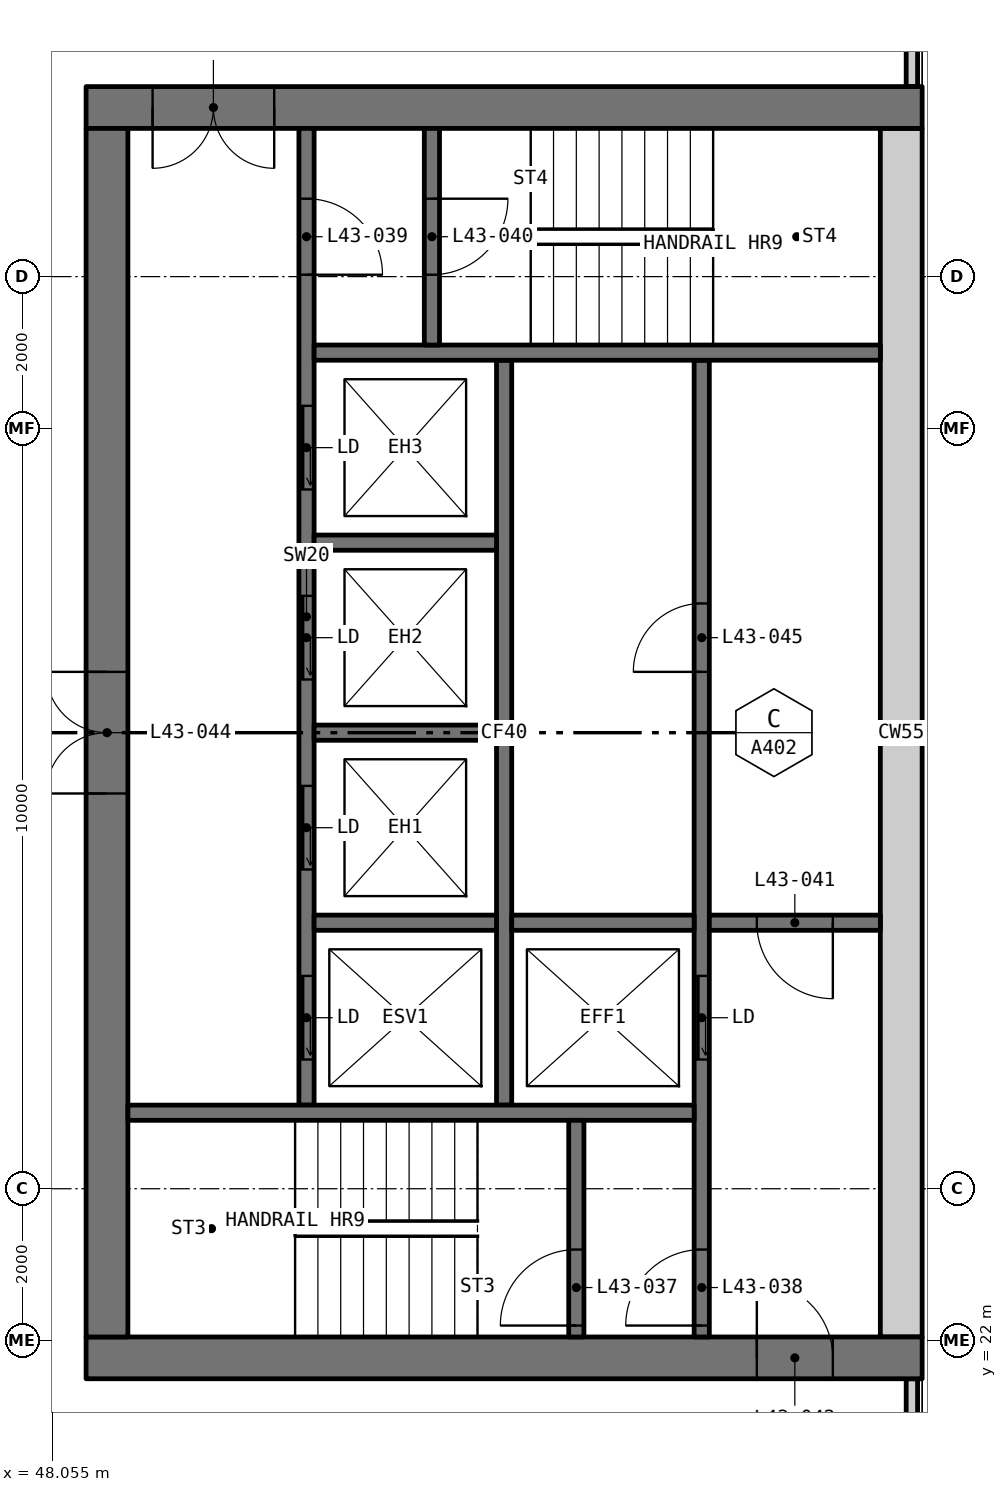
"""IFC4 building model, lengths in metres.
Left out: names, types, materials, properties, quantities, classifications, styles, units other than length and angle.
Written with IfcOpenShell. Run it as: python <this file> out.ifc"""

import sys

from ifc_helpers import new_model, si_unit, direction, frame, frame_2d, origin, place, context, subcontext, project, spatial, rectangle, extrude, element, fill, save


model = new_model("IFC4")
c1 = context("Model", 3, precision=1e-05, world=origin(), true_north=direction((0.0, 1.0)))
c2 = subcontext(c1, "Body", "Model", "MODEL_VIEW")
j1 = project(units=[si_unit("LENGTHUNIT", "METRE"), si_unit("PLANEANGLEUNIT", "RADIAN")], contexts=[c1])
p1 = place(None, origin())
s1 = spatial("IfcSite", under=j1, at=p1, CompositionType="ELEMENT")
p2 = place(p1, origin())
s2 = spatial("IfcBuilding", under=s1, at=p2, CompositionType="ELEMENT")
p3 = place(p2, frame((0.0, 0.0, 165.15)))
s3 = spatial("IfcBuildingStorey", under=s2, at=p3, CompositionType="ELEMENT", Elevation=165.15)
for number, where, z_axis, x_axis in (
    (1, (59.365, 18.71, 0.0), (0.0, 0.0, 1.0), (0.0, 1.0, 0.0)),
    (2, (59.365, 38.5, 0.0), (0.0, 0.0, 1.0), (0.0, 1.0, 0.0)),
):
    element("IfcWall", number, at=place(p3, frame(where, z_axis=z_axis, x_axis=x_axis)), inside=s3, PredefinedType="ELEMENTEDWALL", context=c2, shape_type="SweptSolid", body=[
        extrude(rectangle(XDim=2.79, YDim=0.15, at=frame_2d((1.395, 0.0))), origin(), (0.0, 0.0, 1.0), 3.05),
    ])
p4 = place(p3, frame((59.5, 21.775, 0.0), z_axis=(0.0, 0.0, 1.0), x_axis=(-1.0, 0.0, 0.0)))
e3 = element("IfcWall", 3, at=p4, inside=s3, PredefinedType="SHEAR", context=c2, shape_type="SweptSolid", body=[
    extrude(rectangle(XDim=11.0, YDim=0.55, at=frame_2d((5.5, 0.0))), origin(), (0.0, 0.0, 1.0), 3.05),
])
p5 = place(p4, frame((1.175, 0.0, 0.0)))
e4 = element("IfcOpeningElement", 4, at=p5, cuts=e3, PredefinedType="OPENING", context=c2, shape_type="SweptSolid", body=[
    extrude(rectangle(XDim=1.0, YDim=2.1, at=frame_2d((0.5, 1.05))), frame((0.0, 0.285, 0.0), z_axis=(0.0, -1.0, 0.0), x_axis=(1.0, 0.0, 0.0)), (0.0, 0.0, 1.0), 0.57),
])
p6 = place(p3, frame((59.5, 38.225, 0.0), z_axis=(0.0, 0.0, 1.0), x_axis=(-1.0, 0.0, 0.0)))
e5 = element("IfcWall", 5, at=p6, inside=s3, PredefinedType="SHEAR", context=c2, shape_type="SweptSolid", body=[
    extrude(rectangle(XDim=11.0, YDim=0.55, at=frame_2d((5.5, 0.0))), origin(), (0.0, 0.0, 1.0), 3.05),
])
p7 = place(p6, frame((8.525, 0.0, 0.0)))
e6 = element("IfcOpeningElement", 6, at=p7, cuts=e5, PredefinedType="OPENING", context=c2, shape_type="SweptSolid", body=[
    extrude(rectangle(XDim=1.6, YDim=2.1, at=frame_2d((0.8, 1.05))), frame((0.0, 0.285, 0.0), z_axis=(0.0, -1.0, 0.0), x_axis=(1.0, 0.0, 0.0)), (0.0, 0.0, 1.0), 0.57),
])
p8 = place(p3, frame((59.225, 22.05, 0.0), z_axis=(0.0, 0.0, 1.0), x_axis=(0.0, 1.0, 0.0)))
e7 = element("IfcWall", 7, at=p8, inside=s3, PredefinedType="SHEAR", context=c2, shape_type="SweptSolid", body=[
    extrude(rectangle(XDim=15.9, YDim=0.55, at=frame_2d((7.95, 0.0))), origin(), (0.0, 0.0, 1.0), 3.05),
])
p9 = place(p3, frame((48.775, 22.05, 0.0), z_axis=(0.0, 0.0, 1.0), x_axis=(0.0, 1.0, 0.0)))
e8 = element("IfcWall", 8, at=p9, inside=s3, PredefinedType="SHEAR", context=c2, shape_type="SweptSolid", body=[
    extrude(rectangle(XDim=15.9, YDim=0.55, at=frame_2d((7.95, 0.0))), origin(), (0.0, 0.0, 1.0), 3.05),
])
p10 = place(p9, frame((7.15, 0.0, 0.0)))
e9 = element("IfcOpeningElement", 9, at=p10, cuts=e8, PredefinedType="OPENING", context=c2, shape_type="SweptSolid", body=[
    extrude(rectangle(XDim=1.6, YDim=2.1, at=frame_2d((0.8, 1.05))), frame((0.0, 0.285, 0.0), z_axis=(0.0, -1.0, 0.0), x_axis=(1.0, 0.0, 0.0)), (0.0, 0.0, 1.0), 0.57),
])
p11 = place(p3, frame((56.6, 22.05, 0.0), z_axis=(0.0, 0.0, 1.0), x_axis=(0.0, 1.0, 0.0)))
e10 = element("IfcWall", 10, at=p11, inside=s3, PredefinedType="SOLIDWALL", context=c2, shape_type="SweptSolid", body=[
    extrude(rectangle(XDim=12.85, YDim=0.2, at=frame_2d((6.425, 0.0))), origin(), (0.0, 0.0, 1.0), 3.05),
])
p12 = place(p11, frame((3.65, 0.0, 0.0)))
e11 = element("IfcOpeningElement", 11, at=p12, cuts=e10, PredefinedType="OPENING", context=c2, shape_type="SweptSolid", body=[
    extrude(rectangle(XDim=1.1, YDim=2.1, at=frame_2d((0.55, 1.05))), frame((0.0, 0.11, 0.0), z_axis=(0.0, -1.0, 0.0), x_axis=(1.0, 0.0, 0.0)), (0.0, 0.0, 1.0), 0.22),
])
p13 = place(p11, frame((0.15, 0.0, 0.0)))
e12 = element("IfcOpeningElement", 12, at=p13, cuts=e10, PredefinedType="OPENING", context=c2, shape_type="SweptSolid", body=[
    extrude(rectangle(XDim=1.0, YDim=2.1, at=frame_2d((0.5, 1.05))), frame((0.0, 0.11, 0.0), z_axis=(0.0, -1.0, 0.0), x_axis=(1.0, 0.0, 0.0)), (0.0, 0.0, 1.0), 0.22),
])
p14 = place(p11, frame((8.75, 0.0, 0.0)))
e13 = element("IfcOpeningElement", 13, at=p14, cuts=e10, PredefinedType="OPENING", context=c2, shape_type="SweptSolid", body=[
    extrude(rectangle(XDim=0.9, YDim=2.1, at=frame_2d((0.45, 1.05))), frame((0.0, 0.11, 0.0), z_axis=(0.0, -1.0, 0.0), x_axis=(1.0, 0.0, 0.0)), (0.0, 0.0, 1.0), 0.22),
])
p15 = place(p3, frame((51.4, 25.1, 0.0), z_axis=(0.0, 0.0, 1.0), x_axis=(0.0, 1.0, 0.0)))
e14 = element("IfcWall", 14, at=p15, inside=s3, PredefinedType="SOLIDWALL", context=c2, shape_type="SweptSolid", body=[
    extrude(rectangle(XDim=12.85, YDim=0.2, at=frame_2d((6.425, 0.0))), origin(), (0.0, 0.0, 1.0), 3.05),
])
p16 = place(p15, frame((0.6, 0.0, 0.0)))
e15 = element("IfcOpeningElement", 15, at=p16, cuts=e14, PredefinedType="OPENING", context=c2, shape_type="SweptSolid", body=[
    extrude(rectangle(XDim=1.1, YDim=2.1, at=frame_2d((0.55, 1.05))), frame((0.0, 0.11, 0.0), z_axis=(0.0, -1.0, 0.0), x_axis=(1.0, 0.0, 0.0)), (0.0, 0.0, 1.0), 0.22),
])
p17 = place(p15, frame((3.1, 0.0, 0.0)))
e16 = element("IfcOpeningElement", 16, at=p17, cuts=e14, PredefinedType="OPENING", context=c2, shape_type="SweptSolid", body=[
    extrude(rectangle(XDim=1.1, YDim=2.1, at=frame_2d((0.55, 1.05))), frame((0.0, 0.11, 0.0), z_axis=(0.0, -1.0, 0.0), x_axis=(1.0, 0.0, 0.0)), (0.0, 0.0, 1.0), 0.22),
])
p18 = place(p15, frame((5.6, 0.0, 0.0)))
e17 = element("IfcOpeningElement", 17, at=p18, cuts=e14, PredefinedType="OPENING", context=c2, shape_type="SweptSolid", body=[
    extrude(rectangle(XDim=1.1, YDim=2.1, at=frame_2d((0.55, 1.05))), frame((0.0, 0.11, 0.0), z_axis=(0.0, -1.0, 0.0), x_axis=(1.0, 0.0, 0.0)), (0.0, 0.0, 1.0), 0.22),
])
p19 = place(p15, frame((8.1, 0.0, 0.0)))
e18 = element("IfcOpeningElement", 18, at=p19, cuts=e14, PredefinedType="OPENING", context=c2, shape_type="SweptSolid", body=[
    extrude(rectangle(XDim=1.1, YDim=2.1, at=frame_2d((0.55, 1.05))), frame((0.0, 0.11, 0.0), z_axis=(0.0, -1.0, 0.0), x_axis=(1.0, 0.0, 0.0)), (0.0, 0.0, 1.0), 0.22),
])
p20 = place(p15, frame((10.925, 0.0, 0.0)))
e19 = element("IfcOpeningElement", 19, at=p20, cuts=e14, PredefinedType="OPENING", context=c2, shape_type="SweptSolid", body=[
    extrude(rectangle(XDim=1.0, YDim=2.1, at=frame_2d((0.5, 1.05))), frame((0.0, 0.11, 0.0), z_axis=(0.0, -1.0, 0.0), x_axis=(1.0, 0.0, 0.0)), (0.0, 0.0, 1.0), 0.22),
])
p21 = place(p3, frame((54.0, 25.1, 0.0), z_axis=(0.0, 0.0, 1.0), x_axis=(0.0, 1.0, 0.0)))
e20 = element("IfcWall", 20, at=p21, inside=s3, PredefinedType="SOLIDWALL", context=c2, shape_type="SweptSolid", body=[
    extrude(rectangle(XDim=9.8, YDim=0.2, at=frame_2d((4.9, 0.0))), origin(), (0.0, 0.0, 1.0), 3.05),
])
for number, where, z_axis, x_axis in (
    (21, (56.5, 25.0, 0.0), (0.0, 0.0, 1.0), (-1.0, 0.0, 0.0)),
    (22, (58.95, 35.0, 0.0), (0.0, 0.0, 1.0), (-1.0, 0.0, 0.0)),
):
    element("IfcWall", number, at=place(p3, frame(where, z_axis=z_axis, x_axis=x_axis)), inside=s3, PredefinedType="SOLIDWALL", context=c2, shape_type="SweptSolid", body=[
        extrude(rectangle(XDim=7.45, YDim=0.2, at=frame_2d((3.725, 0.0))), origin(), (0.0, 0.0, 1.0), 3.05),
    ])
p22 = place(p3, frame((58.95, 27.5, 0.0), z_axis=(0.0, 0.0, 1.0), x_axis=(-1.0, 0.0, 0.0)))
e23 = element("IfcWall", 23, at=p22, inside=s3, PredefinedType="SOLIDWALL", context=c2, shape_type="SweptSolid", body=[
    extrude(rectangle(XDim=2.25, YDim=0.2, at=frame_2d((1.125, 0.0))), origin(), (0.0, 0.0, 1.0), 3.05),
])
p23 = place(p22, frame((0.625, 0.0, 0.0)))
e24 = element("IfcOpeningElement", 24, at=p23, cuts=e23, PredefinedType="OPENING", context=c2, shape_type="SweptSolid", body=[
    extrude(rectangle(XDim=1.0, YDim=2.1, at=frame_2d((0.5, 1.05))), frame((0.0, 0.11, 0.0), z_axis=(0.0, -1.0, 0.0), x_axis=(1.0, 0.0, 0.0)), (0.0, 0.0, 1.0), 0.22),
])
p24 = place(p3, frame((54.95, 22.05, 0.0), z_axis=(0.0, 0.0, 1.0), x_axis=(0.0, 1.0, 0.0)))
e25 = element("IfcWall", 25, at=p24, inside=s3, PredefinedType="SOLIDWALL", context=c2, shape_type="SweptSolid", body=[
    extrude(rectangle(XDim=2.85, YDim=0.2, at=frame_2d((1.425, 0.0))), origin(), (0.0, 0.0, 1.0), 3.05),
])
p25 = place(p24, frame((0.15, 0.0, 0.0)))
e26 = element("IfcOpeningElement", 26, at=p25, cuts=e25, PredefinedType="OPENING", context=c2, shape_type="SweptSolid", body=[
    extrude(rectangle(XDim=1.0, YDim=2.1, at=frame_2d((0.5, 1.05))), frame((0.0, 0.11, 0.0), z_axis=(0.0, -1.0, 0.0), x_axis=(1.0, 0.0, 0.0)), (0.0, 0.0, 1.0), 0.22),
])
p26 = place(p3, frame((53.05, 35.1, 0.0), z_axis=(0.0, 0.0, 1.0), x_axis=(0.0, 1.0, 0.0)))
e27 = element("IfcWall", 27, at=p26, inside=s3, PredefinedType="SOLIDWALL", context=c2, shape_type="SweptSolid", body=[
    extrude(rectangle(XDim=2.85, YDim=0.2, at=frame_2d((1.425, 0.0))), origin(), (0.0, 0.0, 1.0), 3.05),
])
p27 = place(p26, frame((0.925, 0.0, 0.0)))
e28 = element("IfcOpeningElement", 28, at=p27, cuts=e27, PredefinedType="OPENING", context=c2, shape_type="SweptSolid", body=[
    extrude(rectangle(XDim=1.0, YDim=2.1, at=frame_2d((0.5, 1.05))), frame((0.0, 0.11, 0.0), z_axis=(0.0, -1.0, 0.0), x_axis=(1.0, 0.0, 0.0)), (0.0, 0.0, 1.0), 0.22),
])
for number, where, z_axis, x_axis in (
    (29, (56.5, 27.5, 0.0), (0.0, 0.0, 1.0), (-1.0, 0.0, 0.0)),
    (30, (53.9, 27.5, 0.0), (0.0, 0.0, 1.0), (-1.0, 0.0, 0.0)),
    (31, (53.9, 30.0, 0.0), (0.0, 0.0, 1.0), (-1.0, 0.0, 0.0)),
    (32, (53.9, 32.5, 0.0), (0.0, 0.0, 1.0), (-1.0, 0.0, 0.0)),
):
    element("IfcWall", number, at=place(p3, frame(where, z_axis=z_axis, x_axis=x_axis)), inside=s3, PredefinedType="SOLIDWALL", context=c2, shape_type="SweptSolid", body=[
        extrude(rectangle(XDim=2.4, YDim=0.2, at=frame_2d((1.2, 0.0))), origin(), (0.0, 0.0, 1.0), 3.05),
    ])
p28 = place(p16, origin())
e33 = element("IfcDoor", 33, at=p28, inside=s3, OperationType="SLIDING_TO_LEFT", PredefinedType="DOOR", context=c2, shape_type="SweptSolid", body=[
    extrude(rectangle(XDim=1.1, YDim=2.1, at=frame_2d((0.55, 1.05))), frame((0.0, 0.025, 0.0), z_axis=(0.0, -1.0, 0.0), x_axis=(1.0, 0.0, 0.0)), (0.0, 0.0, 1.0), 0.05),
])
fill(e15, e33)
p29 = place(p17, origin())
e34 = element("IfcDoor", 34, at=p29, inside=s3, OperationType="SLIDING_TO_LEFT", PredefinedType="DOOR", context=c2, shape_type="SweptSolid", body=[
    extrude(rectangle(XDim=1.1, YDim=2.1, at=frame_2d((0.55, 1.05))), frame((0.0, 0.025, 0.0), z_axis=(0.0, -1.0, 0.0), x_axis=(1.0, 0.0, 0.0)), (0.0, 0.0, 1.0), 0.05),
])
fill(e16, e34)
p30 = place(p18, origin())
e35 = element("IfcDoor", 35, at=p30, inside=s3, OperationType="SLIDING_TO_LEFT", PredefinedType="DOOR", context=c2, shape_type="SweptSolid", body=[
    extrude(rectangle(XDim=1.1, YDim=2.1, at=frame_2d((0.55, 1.05))), frame((0.0, 0.025, 0.0), z_axis=(0.0, -1.0, 0.0), x_axis=(1.0, 0.0, 0.0)), (0.0, 0.0, 1.0), 0.05),
])
fill(e17, e35)
p31 = place(p19, origin())
e36 = element("IfcDoor", 36, at=p31, inside=s3, OperationType="SLIDING_TO_LEFT", PredefinedType="DOOR", context=c2, shape_type="SweptSolid", body=[
    extrude(rectangle(XDim=1.1, YDim=2.1, at=frame_2d((0.55, 1.05))), frame((0.0, 0.025, 0.0), z_axis=(0.0, -1.0, 0.0), x_axis=(1.0, 0.0, 0.0)), (0.0, 0.0, 1.0), 0.05),
])
fill(e18, e36)
p32 = place(p12, origin())
e37 = element("IfcDoor", 37, at=p32, inside=s3, OperationType="SLIDING_TO_LEFT", PredefinedType="DOOR", context=c2, shape_type="SweptSolid", body=[
    extrude(rectangle(XDim=1.1, YDim=2.1, at=frame_2d((0.55, 1.05))), frame((0.0, 0.025, 0.0), z_axis=(0.0, -1.0, 0.0), x_axis=(1.0, 0.0, 0.0)), (0.0, 0.0, 1.0), 0.05),
])
fill(e11, e37)
p33 = place(p25, origin())
e38 = element("IfcDoor", 38, at=p33, inside=s3, OperationType="SINGLE_SWING_RIGHT", PredefinedType="DOOR", context=c2, shape_type="SweptSolid", body=[
    extrude(rectangle(XDim=1.0, YDim=2.1, at=frame_2d((0.5, 1.05))), frame((0.0, 0.025, 0.0), z_axis=(0.0, -1.0, 0.0), x_axis=(1.0, 0.0, 0.0)), (0.0, 0.0, 1.0), 0.05),
])
fill(e26, e38)
p34 = place(p13, origin())
e39 = element("IfcDoor", 39, at=p34, inside=s3, OperationType="SINGLE_SWING_RIGHT", PredefinedType="DOOR", context=c2, shape_type="SweptSolid", body=[
    extrude(rectangle(XDim=1.0, YDim=2.1, at=frame_2d((0.5, 1.05))), frame((0.0, 0.025, 0.0), z_axis=(0.0, -1.0, 0.0), x_axis=(1.0, 0.0, 0.0)), (0.0, 0.0, 1.0), 0.05),
])
fill(e12, e39)
p35 = place(p20, frame((1.0, 0.0, 0.0), x_axis=(-1.0, 0.0, 0.0)))
e40 = element("IfcDoor", 40, at=p35, inside=s3, OperationType="SINGLE_SWING_LEFT", PredefinedType="DOOR", context=c2, shape_type="SweptSolid", body=[
    extrude(rectangle(XDim=1.0, YDim=2.1, at=frame_2d((0.5, 1.05))), frame((0.0, 0.025, 0.0), z_axis=(0.0, -1.0, 0.0), x_axis=(1.0, 0.0, 0.0)), (0.0, 0.0, 1.0), 0.05),
])
fill(e19, e40)
p36 = place(p27, frame((1.0, 0.0, 0.0), x_axis=(-1.0, 0.0, 0.0)))
e41 = element("IfcDoor", 41, at=p36, inside=s3, OperationType="SINGLE_SWING_RIGHT", PredefinedType="DOOR", context=c2, shape_type="SweptSolid", body=[
    extrude(rectangle(XDim=1.0, YDim=2.1, at=frame_2d((0.5, 1.05))), frame((0.0, 0.025, 0.0), z_axis=(0.0, -1.0, 0.0), x_axis=(1.0, 0.0, 0.0)), (0.0, 0.0, 1.0), 0.05),
])
fill(e28, e41)
p37 = place(p23, origin())
e42 = element("IfcDoor", 42, at=p37, inside=s3, OperationType="SINGLE_SWING_RIGHT", PredefinedType="DOOR", context=c2, shape_type="SweptSolid", body=[
    extrude(rectangle(XDim=1.0, YDim=2.1, at=frame_2d((0.5, 1.05))), frame((0.0, 0.025, 0.0), z_axis=(0.0, -1.0, 0.0), x_axis=(1.0, 0.0, 0.0)), (0.0, 0.0, 1.0), 0.05),
])
fill(e24, e42)
p38 = place(p5, frame((1.0, 0.0, 0.0), x_axis=(-1.0, 0.0, 0.0)))
e43 = element("IfcDoor", 43, at=p38, inside=s3, OperationType="SINGLE_SWING_RIGHT", PredefinedType="DOOR", context=c2, shape_type="SweptSolid", body=[
    extrude(rectangle(XDim=1.0, YDim=2.1, at=frame_2d((0.5, 1.05))), frame((0.0, 0.025, 0.0), z_axis=(0.0, -1.0, 0.0), x_axis=(1.0, 0.0, 0.0)), (0.0, 0.0, 1.0), 0.05),
])
fill(e4, e43)
p39 = place(p7, origin())
e44 = element("IfcDoor", 44, at=p39, inside=s3, OperationType="DOUBLE_DOOR_SINGLE_SWING", PredefinedType="DOOR", context=c2, shape_type="SweptSolid", body=[
    extrude(rectangle(XDim=1.6, YDim=2.1, at=frame_2d((0.8, 1.05))), frame((0.0, 0.025, 0.0), z_axis=(0.0, -1.0, 0.0), x_axis=(1.0, 0.0, 0.0)), (0.0, 0.0, 1.0), 0.05),
])
fill(e6, e44)
p40 = place(p10, origin())
e45 = element("IfcDoor", 45, at=p40, inside=s3, OperationType="DOUBLE_DOOR_SINGLE_SWING", PredefinedType="DOOR", context=c2, shape_type="SweptSolid", body=[
    extrude(rectangle(XDim=1.6, YDim=2.1, at=frame_2d((0.8, 1.05))), frame((0.0, 0.025, 0.0), z_axis=(0.0, -1.0, 0.0), x_axis=(1.0, 0.0, 0.0)), (0.0, 0.0, 1.0), 0.05),
])
fill(e9, e45)
p41 = place(p14, origin())
e46 = element("IfcDoor", 46, at=p41, inside=s3, OperationType="SINGLE_SWING_RIGHT", PredefinedType="DOOR", context=c2, shape_type="SweptSolid", body=[
    extrude(rectangle(XDim=0.9, YDim=2.1, at=frame_2d((0.45, 1.05))), frame((0.0, 0.025, 0.0), z_axis=(0.0, -1.0, 0.0), x_axis=(1.0, 0.0, 0.0)), (0.0, 0.0, 1.0), 0.05),
])
fill(e13, e46)
save(model, sys.argv[1])
